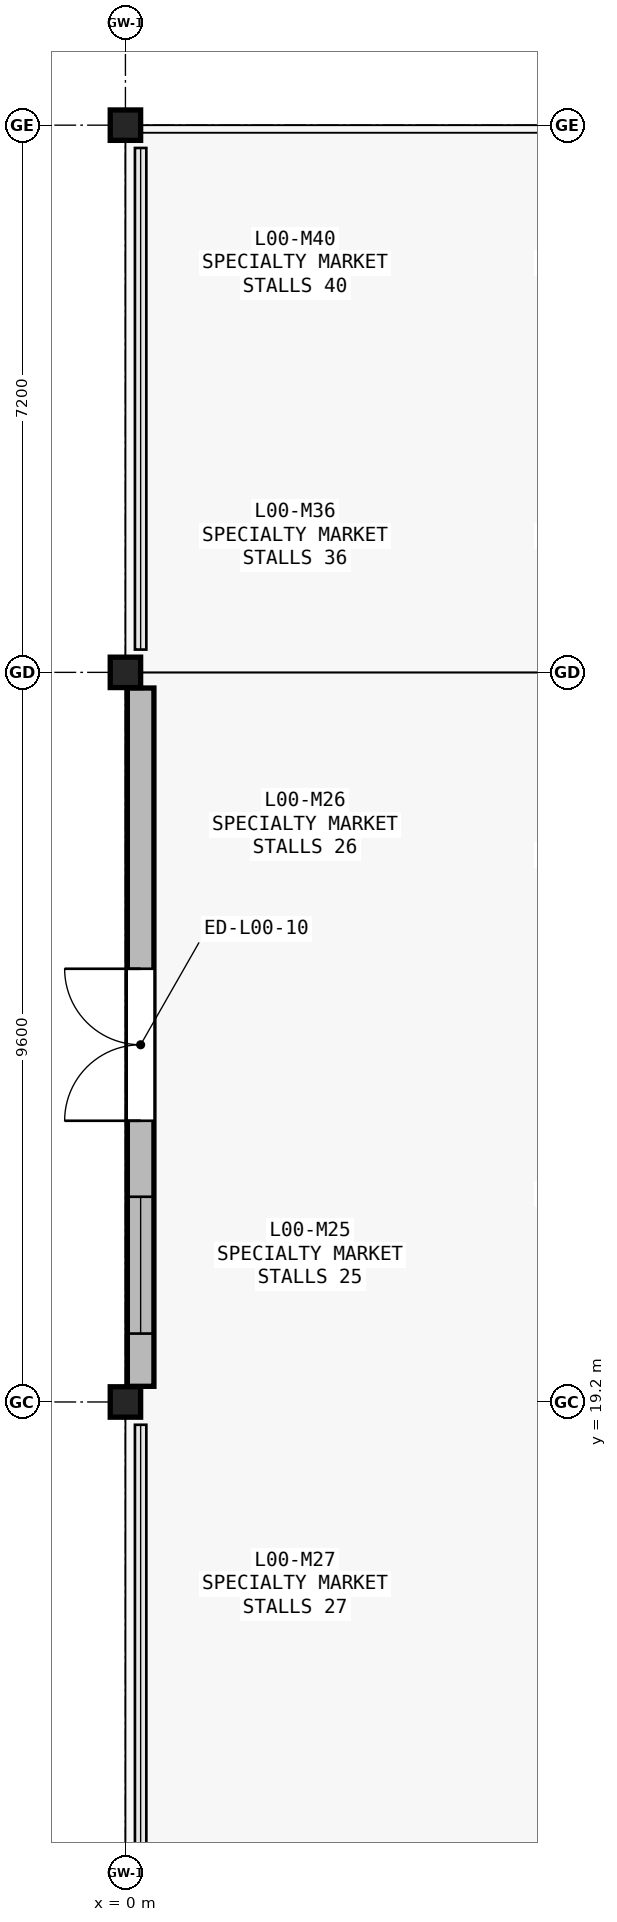
"""IFC4 building model, lengths in metres.
Left out: names, types, materials, properties, quantities, classifications, styles, units other than length and angle.
Written with IfcOpenShell. Run it as: python <this file> out.ifc"""

import sys

from ifc_helpers import new_model, si_unit, direction, frame, frame_2d, origin, origin_2d, place, context, subcontext, project, spatial, rectangle, i_section, extrude, element, fill, save


model = new_model("IFC4")
c1 = context("Model", 3, precision=1e-05, world=origin(), true_north=direction((0.0, 1.0)))
c2 = subcontext(c1, "Body", "Model", "MODEL_VIEW")
j1 = project(units=[si_unit("LENGTHUNIT", "METRE"), si_unit("PLANEANGLEUNIT", "RADIAN")], contexts=[c1])
p1 = place(None, origin())
s1 = spatial("IfcSite", under=j1, at=p1, CompositionType="ELEMENT")
p2 = place(p1, origin())
s2 = spatial("IfcBuilding", under=s1, at=p2, CompositionType="ELEMENT")
p3 = place(p2, origin())
s3 = spatial("IfcBuildingStorey", under=s2, at=p3, CompositionType="ELEMENT", Elevation=0.0)
for number, where, z_axis, x_axis in (
    (1, (0.0, 19.2, 0.0), (0.0, 0.0, 1.0), (1.0, 0.0, 0.0)),
    (2, (0.0, 28.8, 0.0), (0.0, 0.0, 1.0), (1.0, 0.0, 0.0)),
    (3, (0.0, 36.0, 0.0), (0.0, 0.0, 1.0), (1.0, 0.0, 0.0)),
):
    element("IfcColumn", number, at=place(p3, frame(where, z_axis=z_axis, x_axis=x_axis)), inside=s3, PredefinedType="COLUMN", context=c2, shape_type="SweptSolid", body=[
        extrude(i_section(OverallWidth=0.4, OverallDepth=0.4, WebThickness=0.013, FlangeThickness=0.021, FilletRadius=0.022, at=origin_2d()), origin(), (0.0, 0.0, 1.0), 6.0),
    ])
p4 = place(p3, frame((0.2, 19.406, 0.0), z_axis=(0.0, 0.0, 1.0), x_axis=(0.0, 1.0, 0.0)))
e4 = element("IfcWall", 4, at=p4, inside=s3, PredefinedType="SOLIDWALL", context=c2, shape_type="SweptSolid", body=[
    extrude(rectangle(XDim=9.188, YDim=0.35, at=frame_2d((4.594, 0.0))), origin(), (0.0, 0.0, 1.0), 5.12),
])
p5 = place(p4, frame((3.494, 0.0, 0.0)))
e5 = element("IfcOpeningElement", 5, at=p5, cuts=e4, PredefinedType="OPENING", context=c2, shape_type="SweptSolid", body=[
    extrude(rectangle(XDim=2.0, YDim=2.2, at=frame_2d((1.0, 1.1))), frame((0.0, 0.185, 0.0), z_axis=(0.0, -1.0, 0.0), x_axis=(1.0, 0.0, 0.0)), (0.0, 0.0, 1.0), 0.37),
])
p6 = place(p4, frame((0.694, 0.0, 1.05)))
e6 = element("IfcOpeningElement", 6, at=p6, cuts=e4, PredefinedType="OPENING", context=c2, shape_type="SweptSolid", body=[
    extrude(rectangle(XDim=1.8, YDim=1.8, at=frame_2d((0.9, 0.9))), frame((0.0, 0.185, 0.0), z_axis=(0.0, -1.0, 0.0), x_axis=(1.0, 0.0, 0.0)), (0.0, 0.0, 1.0), 0.37),
])
p7 = place(p2, frame((0.0, 0.0, -5.4)))
s4 = spatial("IfcBuildingStorey", under=s2, at=p7, CompositionType="ELEMENT", Elevation=-5.4)
p8 = place(p7, frame((0.42, 36.2, 0.0), z_axis=(0.0, 0.0, 1.0), x_axis=(0.0, 1.0, 0.0)))
e7 = element("IfcWall", 7, at=p8, inside=s4, PredefinedType="USERDEFINED", context=c2, shape_type="SweptSolid", body=[
    extrude(rectangle(XDim=48.0, YDim=0.36, at=frame_2d((24.0, 0.0))), origin(), (0.0, 0.0, 1.0), 9.0),
])
p9 = place(p5, origin())
e8 = element("IfcDoor", 8, at=p9, inside=s3, OperationType="DOUBLE_DOOR_SINGLE_SWING", PredefinedType="DOOR", context=c2, shape_type="SweptSolid", body=[
    extrude(rectangle(XDim=2.0, YDim=2.2, at=frame_2d((1.0, 1.1))), frame((0.0, 0.025, 0.0), z_axis=(0.0, -1.0, 0.0), x_axis=(1.0, 0.0, 0.0)), (0.0, 0.0, 1.0), 0.05),
])
fill(e5, e8)
p10 = place(p6, origin())
e9 = element("IfcWindow", 9, at=p10, inside=s3, PartitioningType="SINGLE_PANEL", PredefinedType="WINDOW", context=c2, shape_type="SweptSolid", body=[
    extrude(rectangle(XDim=1.8, YDim=1.8, at=frame_2d((0.9, 0.9))), frame((0.0, 0.03, 0.0), z_axis=(0.0, -1.0, 0.0), x_axis=(1.0, 0.0, 0.0)), (0.0, 0.0, 1.0), 0.06),
])
fill(e6, e9)
save(model, sys.argv[1])
